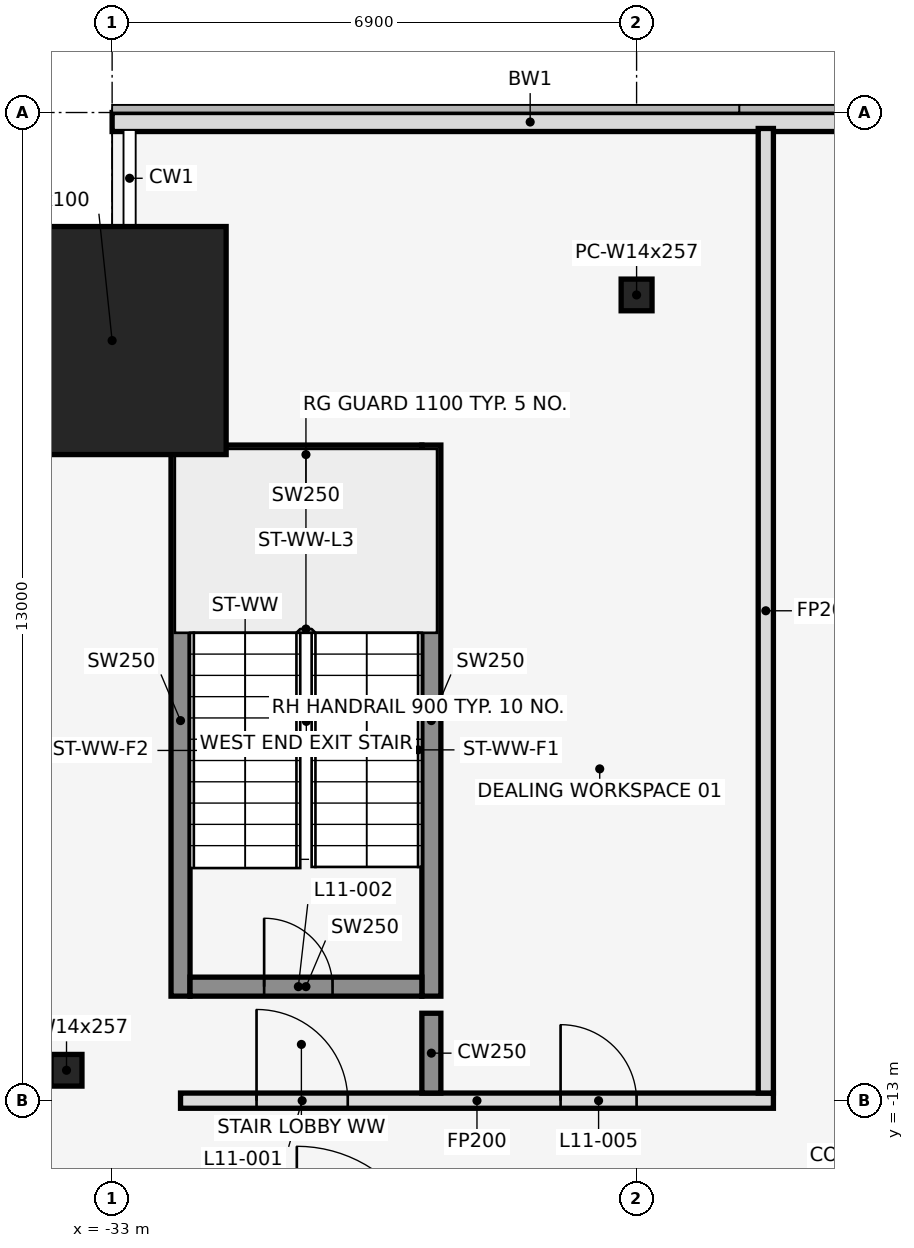
"""IFC4 building model, lengths in metres.
Left out: names, types, materials, properties, quantities, classifications, styles, units other than length and angle.
Written with IfcOpenShell. Run it as: python <this file> out.ifc"""

import sys

from ifc_helpers import new_model, si_unit, direction, frame, frame_2d, origin, origin_2d, place, context, subcontext, project, spatial, rectangle, hollow_rectangle, i_section, extrude, element, fill, save


model = new_model("IFC4")
c1 = context("Model", 3, precision=1e-05, world=origin(), true_north=direction((0.0, 1.0)))
c2 = subcontext(c1, "Body", "Model", "MODEL_VIEW")
j1 = project(units=[si_unit("LENGTHUNIT", "METRE"), si_unit("PLANEANGLEUNIT", "RADIAN")], contexts=[c1])
p1 = place(None, origin())
s1 = spatial("IfcSite", under=j1, at=p1, CompositionType="ELEMENT")
p2 = place(p1, origin())
s2 = spatial("IfcBuilding", under=s1, at=p2, CompositionType="ELEMENT")
p3 = place(p2, frame((0.0, 0.0, 57.5)))
s3 = spatial("IfcBuildingStorey", under=s2, at=p3, CompositionType="ELEMENT", Elevation=57.5)
p4 = place(p3, frame((-33.0, -3.0, 0.0), z_axis=(0.0, 0.0, 1.0), x_axis=(1.0, 0.0, 0.0)))
e1 = element("IfcColumn", 1, at=p4, inside=s3, PredefinedType="COLUMN", context=c2, shape_type="SweptSolid", body=[
    extrude(hollow_rectangle(XDim=3.0, YDim=3.0, WallThickness=0.1, at=origin_2d()), origin(), (0.0, 0.0, 1.0), 4.5),
])
for number, where, z_axis, x_axis in (
    (2, (-26.1, -2.4, 0.0), (0.0, 0.0, 1.0), (1.0, 0.0, 0.0)),
    (3, (-33.6, -12.6, 0.0), (0.0, 0.0, 1.0), (1.0, 0.0, 0.0)),
):
    element("IfcColumn", number, at=place(p3, frame(where, z_axis=z_axis, x_axis=x_axis)), inside=s3, PredefinedType="COLUMN", context=c2, shape_type="SweptSolid", body=[
        extrude(i_section(OverallWidth=0.406, OverallDepth=0.417, WebThickness=0.03, FlangeThickness=0.048, at=origin_2d()), origin(), (0.0, 0.0, 1.0), 4.5),
    ])
p5 = place(p3, frame((-22.0, -0.125, 0.0), z_axis=(0.0, 0.0, 1.0), x_axis=(-1.0, 0.0, 0.0)))
e4 = element("IfcWall", 4, at=p5, inside=s3, PredefinedType="STANDARD", context=c2, shape_type="SweptSolid", body=[
    extrude(rectangle(XDim=11.0, YDim=0.25, at=frame_2d((5.5, 0.0))), origin(), (0.0, 0.0, 1.0), 4.35),
])
for number, where, z_axis, x_axis in (
    (5, (-32.1, -11.625, 0.0), (0.0, 0.0, 1.0), (0.0, 1.0, 0.0)),
    (6, (-28.8, -11.625, 0.0), (0.0, 0.0, 1.0), (0.0, 1.0, 0.0)),
):
    element("IfcWall", number, at=place(p3, frame(where, z_axis=z_axis, x_axis=x_axis)), inside=s3, PredefinedType="SHEAR", context=c2, shape_type="SweptSolid", body=[
        extrude(rectangle(XDim=7.25, YDim=0.25, at=frame_2d((3.625, 0.0))), origin(), (0.0, 0.0, 1.0), 4.5),
    ])
p6 = place(p3, frame((-31.975, -11.5, 0.0), z_axis=(0.0, 0.0, 1.0), x_axis=(1.0, 0.0, 0.0)))
e7 = element("IfcWall", 7, at=p6, inside=s3, PredefinedType="SHEAR", context=c2, shape_type="SweptSolid", body=[
    extrude(rectangle(XDim=3.05, YDim=0.25, at=frame_2d((1.525, 0.0))), origin(), (0.0, 0.0, 1.0), 4.5),
])
p7 = place(p6, frame((0.975, 0.0, 0.0)))
e8 = element("IfcOpeningElement", 8, at=p7, cuts=e7, PredefinedType="OPENING", context=c2, shape_type="SweptSolid", body=[
    extrude(rectangle(XDim=0.9, YDim=2.1, at=frame_2d((0.45, 1.05))), frame((0.0, 0.137, 0.0), z_axis=(0.0, -1.0, 0.0), x_axis=(1.0, 0.0, 0.0)), (0.0, 0.0, 1.0), 0.274),
])
p8 = place(p3, frame((-31.975, -4.5, 0.0), z_axis=(0.0, 0.0, 1.0), x_axis=(1.0, 0.0, 0.0)))
e9 = element("IfcWall", 9, at=p8, inside=s3, PredefinedType="SHEAR", context=c2, shape_type="SweptSolid", body=[
    extrude(rectangle(XDim=3.05, YDim=0.25, at=frame_2d((1.525, 0.0))), origin(), (0.0, 0.0, 1.0), 4.5),
])
p9 = place(p3, frame((-32.1, -13.0, 0.0), z_axis=(0.0, 0.0, 1.0), x_axis=(1.0, 0.0, 0.0)))
e10 = element("IfcWall", 10, at=p9, inside=s3, PredefinedType="PARTITIONING", context=c2, shape_type="SweptSolid", body=[
    extrude(rectangle(XDim=7.8, YDim=0.2, at=frame_2d((3.9, 0.0))), origin(), (0.0, 0.0, 1.0), 3.418),
])
p10 = place(p9, frame((1.0, 0.0, 0.0)))
e11 = element("IfcOpeningElement", 11, at=p10, cuts=e10, PredefinedType="OPENING", context=c2, shape_type="SweptSolid", body=[
    extrude(rectangle(XDim=1.2, YDim=2.1, at=frame_2d((0.6, 1.05))), frame((0.0, 0.112, 0.0), z_axis=(0.0, -1.0, 0.0), x_axis=(1.0, 0.0, 0.0)), (0.0, 0.0, 1.0), 0.224),
])
p11 = place(p9, frame((5.0, 0.0, 0.0)))
e12 = element("IfcOpeningElement", 12, at=p11, cuts=e10, PredefinedType="OPENING", context=c2, shape_type="SweptSolid", body=[
    extrude(rectangle(XDim=1.0, YDim=2.1, at=frame_2d((0.5, 1.05))), frame((0.0, 0.112, 0.0), z_axis=(0.0, -1.0, 0.0), x_axis=(1.0, 0.0, 0.0)), (0.0, 0.0, 1.0), 0.224),
])
p12 = place(p3, frame((-28.8, -12.9, 0.0), z_axis=(0.0, 0.0, 1.0), x_axis=(0.0, 1.0, 0.0)))
e13 = element("IfcWall", 13, at=p12, inside=s3, PredefinedType="SHEAR", context=c2, shape_type="SweptSolid", body=[
    extrude(rectangle(XDim=1.05, YDim=0.25, at=frame_2d((0.525, 0.0))), origin(), (0.0, 0.0, 1.0), 4.5),
])
p13 = place(p3, frame((-24.4, -12.9, 0.0), z_axis=(0.0, 0.0, 1.0), x_axis=(0.0, 1.0, 0.0)))
e14 = element("IfcWall", 14, at=p13, inside=s3, PredefinedType="PARTITIONING", context=c2, shape_type="SweptSolid", body=[
    extrude(rectangle(XDim=12.69, YDim=0.2, at=frame_2d((6.345, 0.0))), origin(), (0.0, 0.0, 1.0), 3.418),
])
p14 = place(p10, origin())
e15 = element("IfcDoor", 15, at=p14, inside=s3, OperationType="SINGLE_SWING_LEFT", PredefinedType="DOOR", context=c2, shape_type="SweptSolid", body=[
    extrude(rectangle(XDim=1.2, YDim=2.1, at=frame_2d((0.6, 1.05))), frame((0.0, 0.025, 0.0), z_axis=(0.0, -1.0, 0.0), x_axis=(1.0, 0.0, 0.0)), (0.0, 0.0, 1.0), 0.05),
])
fill(e11, e15)
p15 = place(p7, origin())
e16 = element("IfcDoor", 16, at=p15, inside=s3, OperationType="SINGLE_SWING_LEFT", PredefinedType="DOOR", context=c2, shape_type="SweptSolid", body=[
    extrude(rectangle(XDim=0.9, YDim=2.1, at=frame_2d((0.45, 1.05))), frame((0.0, 0.025, 0.0), z_axis=(0.0, -1.0, 0.0), x_axis=(1.0, 0.0, 0.0)), (0.0, 0.0, 1.0), 0.05),
])
fill(e8, e16)
p16 = place(p11, origin())
e17 = element("IfcDoor", 17, at=p16, inside=s3, OperationType="SINGLE_SWING_LEFT", PredefinedType="DOOR", context=c2, shape_type="SweptSolid", body=[
    extrude(rectangle(XDim=1.0, YDim=2.1, at=frame_2d((0.5, 1.05))), frame((0.0, 0.025, 0.0), z_axis=(0.0, -1.0, 0.0), x_axis=(1.0, 0.0, 0.0)), (0.0, 0.0, 1.0), 0.05),
])
fill(e12, e17)
save(model, sys.argv[1])
